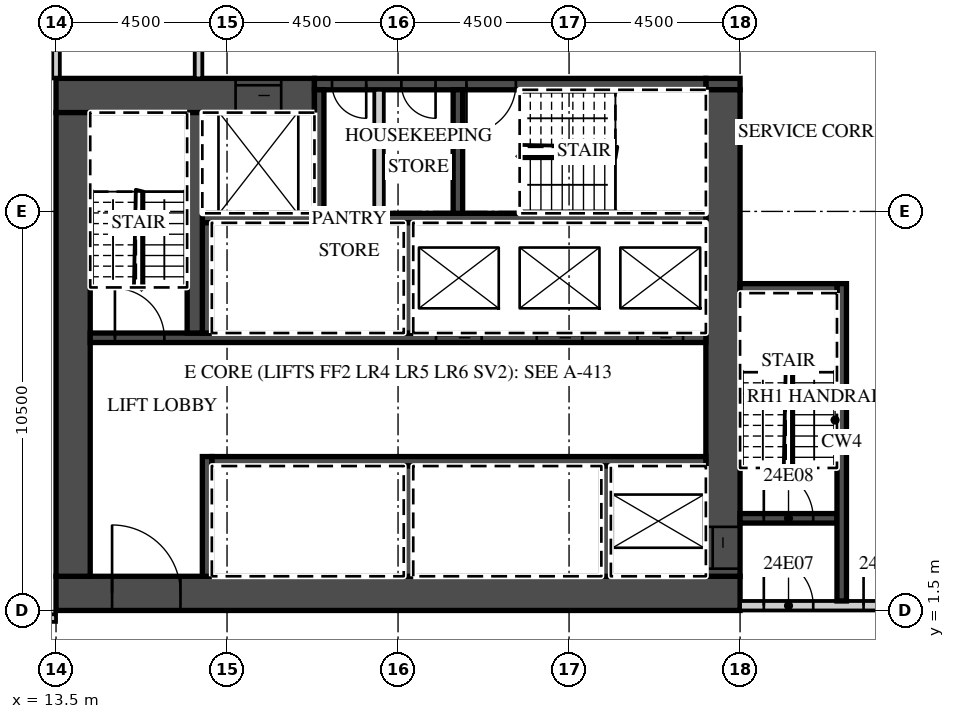
"""IFC4 building model, lengths in metres.
Left out: names, types, materials, properties, quantities, classifications, styles, units other than length and angle.
Written with IfcOpenShell. Run it as: python <this file> out.ifc"""

import sys

from ifc_helpers import new_model, si_unit, direction, frame, frame_2d, origin, place, context, subcontext, project, spatial, rectangle, extrude, element, fill, save


model = new_model("IFC4")
c1 = context("Model", 3, precision=1e-05, world=origin(), true_north=direction((0.0, 1.0)))
c2 = subcontext(c1, "Body", "Model", "MODEL_VIEW")
j1 = project(units=[si_unit("LENGTHUNIT", "METRE"), si_unit("PLANEANGLEUNIT", "RADIAN")], contexts=[c1])
p1 = place(None, origin())
s1 = spatial("IfcSite", under=j1, at=p1, CompositionType="ELEMENT")
p2 = place(p1, origin())
s2 = spatial("IfcBuilding", under=s1, at=p2, CompositionType="ELEMENT")
p3 = place(p2, frame((0.0, 0.0, 114.1)))
s3 = spatial("IfcBuildingStorey", under=s2, at=p3, CompositionType="ELEMENT", Elevation=114.1)
p4 = place(p3, frame((13.5, 15.5, 0.0), z_axis=(0.0, 0.0, 1.0), x_axis=(0.0, 1.0, 0.0)))
e1 = element("IfcWall", 1, at=p4, inside=s3, PredefinedType="PARTITIONING", context=c2, shape_type="SweptSolid", body=[
    extrude(rectangle(XDim=7.162, YDim=0.2, at=frame_2d((3.581, 0.0))), origin(), (0.0, 0.0, 1.0), 3.02),
])
p5 = place(p3, frame((-39.316, 1.3, 0.0), z_axis=(0.0, 0.0, 1.0), x_axis=(1.0, 0.0, 0.0)))
e2 = element("IfcWall", 2, at=p5, inside=s3, PredefinedType="PARTITIONING", context=c2, shape_type="SweptSolid", body=[
    extrude(rectangle(XDim=52.816, YDim=0.2, at=frame_2d((26.408, 0.0))), origin(), (0.0, 0.0, 1.0), 3.02),
])
p6 = place(p5, frame((0.15, 0.0, 0.0)))
e3 = element("IfcOpeningElement", 3, at=p6, cuts=e2, PredefinedType="OPENING", context=c2, shape_type="SweptSolid", body=[
    extrude(rectangle(XDim=0.9, YDim=2.1, at=frame_2d((0.45, 1.05))), frame((0.0, 0.11, 0.0), z_axis=(0.0, -1.0, 0.0), x_axis=(1.0, 0.0, 0.0)), (0.0, 0.0, 1.0), 0.22),
])
p7 = place(p5, frame((6.266, 0.0, 0.0)))
e4 = element("IfcOpeningElement", 4, at=p7, cuts=e2, PredefinedType="OPENING", context=c2, shape_type="SweptSolid", body=[
    extrude(rectangle(XDim=1.0, YDim=2.1, at=frame_2d((0.5, 1.05))), frame((0.0, 0.11, 0.0), z_axis=(0.0, -1.0, 0.0), x_axis=(1.0, 0.0, 0.0)), (0.0, 0.0, 1.0), 0.22),
])
p8 = place(p5, frame((10.741, 0.0, 0.0)))
e5 = element("IfcOpeningElement", 5, at=p8, cuts=e2, PredefinedType="OPENING", context=c2, shape_type="SweptSolid", body=[
    extrude(rectangle(XDim=1.0, YDim=2.1, at=frame_2d((0.5, 1.05))), frame((0.0, 0.11, 0.0), z_axis=(0.0, -1.0, 0.0), x_axis=(1.0, 0.0, 0.0)), (0.0, 0.0, 1.0), 0.22),
])
p9 = place(p5, frame((17.678, 0.0, 0.0)))
e6 = element("IfcOpeningElement", 6, at=p9, cuts=e2, PredefinedType="OPENING", context=c2, shape_type="SweptSolid", body=[
    extrude(rectangle(XDim=1.2, YDim=2.1, at=frame_2d((0.6, 1.05))), frame((0.0, 0.11, 0.0), z_axis=(0.0, -1.0, 0.0), x_axis=(1.0, 0.0, 0.0)), (0.0, 0.0, 1.0), 0.22),
])
p10 = place(p5, frame((26.678, 0.0, 0.0)))
e7 = element("IfcOpeningElement", 7, at=p10, cuts=e2, PredefinedType="OPENING", context=c2, shape_type="SweptSolid", body=[
    extrude(rectangle(XDim=1.2, YDim=2.1, at=frame_2d((0.6, 1.05))), frame((0.0, 0.11, 0.0), z_axis=(0.0, -1.0, 0.0), x_axis=(1.0, 0.0, 0.0)), (0.0, 0.0, 1.0), 0.22),
])
p11 = place(p5, frame((35.678, 0.0, 0.0)))
e8 = element("IfcOpeningElement", 8, at=p11, cuts=e2, PredefinedType="OPENING", context=c2, shape_type="SweptSolid", body=[
    extrude(rectangle(XDim=1.2, YDim=2.1, at=frame_2d((0.6, 1.05))), frame((0.0, 0.11, 0.0), z_axis=(0.0, -1.0, 0.0), x_axis=(1.0, 0.0, 0.0)), (0.0, 0.0, 1.0), 0.22),
])
p12 = place(p5, frame((41.754, 0.0, 0.0)))
e9 = element("IfcOpeningElement", 9, at=p12, cuts=e2, PredefinedType="OPENING", context=c2, shape_type="SweptSolid", body=[
    extrude(rectangle(XDim=1.2, YDim=2.1, at=frame_2d((0.6, 1.05))), frame((0.0, 0.11, 0.0), z_axis=(0.0, -1.0, 0.0), x_axis=(1.0, 0.0, 0.0)), (0.0, 0.0, 1.0), 0.22),
])
p13 = place(p5, frame((51.241, 0.0, 0.0)))
e10 = element("IfcOpeningElement", 10, at=p13, cuts=e2, PredefinedType="OPENING", context=c2, shape_type="SweptSolid", body=[
    extrude(rectangle(XDim=1.0, YDim=2.1, at=frame_2d((0.5, 1.05))), frame((0.0, 0.11, 0.0), z_axis=(0.0, -1.0, 0.0), x_axis=(1.0, 0.0, 0.0)), (0.0, 0.0, 1.0), 0.22),
])
p14 = place(p3, frame((13.5, 1.95, 0.0), z_axis=(0.0, 0.0, 1.0), x_axis=(1.0, 0.0, 0.0)))
e11 = element("IfcWall", 11, at=p14, inside=s3, PredefinedType="SHEAR", context=c2, shape_type="SweptSolid", body=[
    extrude(rectangle(XDim=18.0, YDim=0.9, at=frame_2d((9.0, 0.0))), origin(), (0.0, 0.0, 1.0), 3.02),
])
p15 = place(p14, frame((1.475, 0.0, 0.0)))
e12 = element("IfcOpeningElement", 12, at=p15, cuts=e11, PredefinedType="OPENING", context=c2, shape_type="SweptSolid", body=[
    extrude(rectangle(XDim=1.8, YDim=2.1, at=frame_2d((0.9, 1.05))), frame((0.0, 0.46, 0.0), z_axis=(0.0, -1.0, 0.0), x_axis=(1.0, 0.0, 0.0)), (0.0, 0.0, 1.0), 0.92),
])
p16 = place(p3, frame((13.5, 15.05, 0.0), z_axis=(0.0, 0.0, 1.0), x_axis=(1.0, 0.0, 0.0)))
e13 = element("IfcWall", 13, at=p16, inside=s3, PredefinedType="SHEAR", context=c2, shape_type="SweptSolid", body=[
    extrude(rectangle(XDim=6.8, YDim=0.9, at=frame_2d((3.4, 0.0))), origin(), (0.0, 0.0, 1.0), 3.02),
])
p17 = place(p16, frame((4.725, 0.0, 0.0)))
e14 = element("IfcOpeningElement", 14, at=p17, cuts=e13, PredefinedType="OPENING", context=c2, shape_type="SweptSolid", body=[
    extrude(rectangle(XDim=1.2, YDim=2.1, at=frame_2d((0.6, 1.05))), frame((0.0, 0.46, 0.0), z_axis=(0.0, -1.0, 0.0), x_axis=(1.0, 0.0, 0.0)), (0.0, 0.0, 1.0), 0.92),
])
p18 = place(p3, frame((30.6, 15.35, 0.0), z_axis=(0.0, 0.0, 1.0), x_axis=(1.0, 0.0, 0.0)))
e15 = element("IfcWall", 15, at=p18, inside=s3, PredefinedType="SHEAR", context=c2, shape_type="SweptSolid", body=[
    extrude(rectangle(XDim=0.9, YDim=0.3, at=frame_2d((0.45, 0.0))), origin(), (0.0, 0.0, 1.0), 3.02),
])
p19 = place(p3, frame((20.3, 15.35, 0.0), z_axis=(0.0, 0.0, 1.0), x_axis=(1.0, 0.0, 0.0)))
e16 = element("IfcWall", 16, at=p19, inside=s3, PredefinedType="SHEAR", context=c2, shape_type="SweptSolid", body=[
    extrude(rectangle(XDim=10.3, YDim=0.3, at=frame_2d((5.15, 0.0))), origin(), (0.0, 0.0, 1.0), 3.02),
])
p20 = place(p19, frame((4.0, 0.0, 0.0)))
e17 = element("IfcOpeningElement", 17, at=p20, cuts=e16, PredefinedType="OPENING", context=c2, shape_type="SweptSolid", body=[
    extrude(rectangle(XDim=1.3, YDim=2.1, at=frame_2d((0.65, 1.05))), frame((0.0, 0.16, 0.0), z_axis=(0.0, -1.0, 0.0), x_axis=(1.0, 0.0, 0.0)), (0.0, 0.0, 1.0), 0.32),
])
p21 = place(p19, frame((2.288, 0.0, 0.0)))
e18 = element("IfcOpeningElement", 18, at=p21, cuts=e16, PredefinedType="OPENING", context=c2, shape_type="SweptSolid", body=[
    extrude(rectangle(XDim=0.9, YDim=2.1, at=frame_2d((0.45, 1.05))), frame((0.0, 0.16, 0.0), z_axis=(0.0, -1.0, 0.0), x_axis=(1.0, 0.0, 0.0)), (0.0, 0.0, 1.0), 0.32),
])
p22 = place(p19, frame((0.462, 0.0, 0.0)))
e19 = element("IfcOpeningElement", 19, at=p22, cuts=e16, PredefinedType="OPENING", context=c2, shape_type="SweptSolid", body=[
    extrude(rectangle(XDim=0.9, YDim=2.1, at=frame_2d((0.45, 1.05))), frame((0.0, 0.16, 0.0), z_axis=(0.0, -1.0, 0.0), x_axis=(1.0, 0.0, 0.0)), (0.0, 0.0, 1.0), 0.32),
])
p23 = place(p3, frame((31.05, 2.4, 0.0), z_axis=(0.0, 0.0, 1.0), x_axis=(0.0, 1.0, 0.0)))
e20 = element("IfcWall", 20, at=p23, inside=s3, PredefinedType="SHEAR", context=c2, shape_type="SweptSolid", body=[
    extrude(rectangle(XDim=12.8, YDim=0.9, at=frame_2d((6.4, 0.0))), origin(), (0.0, 0.0, 1.0), 3.02),
])
p24 = place(p23, frame((0.2, 0.0, 0.0)))
e21 = element("IfcOpeningElement", 21, at=p24, cuts=e20, PredefinedType="OPENING", context=c2, shape_type="SweptSolid", body=[
    extrude(rectangle(XDim=1.1, YDim=2.1, at=frame_2d((0.55, 1.05))), frame((0.0, 0.46, 0.0), z_axis=(0.0, -1.0, 0.0), x_axis=(1.0, 0.0, 0.0)), (0.0, 0.0, 1.0), 0.92),
])
p25 = place(p3, frame((13.95, 2.4, 0.0), z_axis=(0.0, 0.0, 1.0), x_axis=(0.0, 1.0, 0.0)))
e22 = element("IfcWall", 22, at=p25, inside=s3, PredefinedType="SHEAR", context=c2, shape_type="SweptSolid", body=[
    extrude(rectangle(XDim=12.2, YDim=0.9, at=frame_2d((6.1, 0.0))), origin(), (0.0, 0.0, 1.0), 3.02),
])
p26 = place(p3, frame((17.6, 5.425, 0.0), z_axis=(0.0, 0.0, 1.0), x_axis=(1.0, 0.0, 0.0)))
e23 = element("IfcWall", 23, at=p26, inside=s3, PredefinedType="SHEAR", context=c2, shape_type="SweptSolid", body=[
    extrude(rectangle(XDim=13.0, YDim=0.25, at=frame_2d((6.5, 0.0))), origin(), (0.0, 0.0, 1.0), 3.02),
])
p27 = place(p3, frame((17.475, 2.4, 0.0), z_axis=(0.0, 0.0, 1.0), x_axis=(0.0, 1.0, 0.0)))
e24 = element("IfcWall", 24, at=p27, inside=s3, PredefinedType="SHEAR", context=c2, shape_type="SweptSolid", body=[
    extrude(rectangle(XDim=3.15, YDim=0.25, at=frame_2d((1.575, 0.0))), origin(), (0.0, 0.0, 1.0), 3.02),
])
for number, where, z_axis, x_axis in (
    (25, (27.975, 2.4, 0.0), (0.0, 0.0, 1.0), (0.0, 1.0, 0.0)),
    (26, (22.775, 2.4, 0.0), (0.0, 0.0, 1.0), (0.0, 1.0, 0.0)),
):
    element("IfcWall", number, at=place(p3, frame(where, z_axis=z_axis, x_axis=x_axis)), inside=s3, PredefinedType="SHEAR", context=c2, shape_type="SweptSolid", body=[
        extrude(rectangle(XDim=2.9, YDim=0.25, at=frame_2d((1.45, 0.0))), origin(), (0.0, 0.0, 1.0), 3.02),
    ])
p28 = place(p3, frame((14.4, 8.675, 0.0), z_axis=(0.0, 0.0, 1.0), x_axis=(1.0, 0.0, 0.0)))
e27 = element("IfcWall", 27, at=p28, inside=s3, PredefinedType="SHEAR", context=c2, shape_type="SweptSolid", body=[
    extrude(rectangle(XDim=16.2, YDim=0.25, at=frame_2d((8.1, 0.0))), origin(), (0.0, 0.0, 1.0), 3.02),
])
p29 = place(p28, frame((14.4, 0.0, 0.0)))
e28 = element("IfcOpeningElement", 28, at=p29, cuts=e27, PredefinedType="OPENING", context=c2, shape_type="SweptSolid", body=[
    extrude(rectangle(XDim=1.2, YDim=2.1, at=frame_2d((0.6, 1.05))), frame((0.0, 0.135, 0.0), z_axis=(0.0, -1.0, 0.0), x_axis=(1.0, 0.0, 0.0)), (0.0, 0.0, 1.0), 0.27),
])
p30 = place(p28, frame((11.75, 0.0, 0.0)))
e29 = element("IfcOpeningElement", 29, at=p30, cuts=e27, PredefinedType="OPENING", context=c2, shape_type="SweptSolid", body=[
    extrude(rectangle(XDim=1.2, YDim=2.1, at=frame_2d((0.6, 1.05))), frame((0.0, 0.135, 0.0), z_axis=(0.0, -1.0, 0.0), x_axis=(1.0, 0.0, 0.0)), (0.0, 0.0, 1.0), 0.27),
])
p31 = place(p28, frame((9.1, 0.0, 0.0)))
e30 = element("IfcOpeningElement", 30, at=p31, cuts=e27, PredefinedType="OPENING", context=c2, shape_type="SweptSolid", body=[
    extrude(rectangle(XDim=1.2, YDim=2.1, at=frame_2d((0.6, 1.05))), frame((0.0, 0.135, 0.0), z_axis=(0.0, -1.0, 0.0), x_axis=(1.0, 0.0, 0.0)), (0.0, 0.0, 1.0), 0.27),
])
p32 = place(p28, frame((0.65, 0.0, 0.0)))
e31 = element("IfcOpeningElement", 31, at=p32, cuts=e27, PredefinedType="OPENING", context=c2, shape_type="SweptSolid", body=[
    extrude(rectangle(XDim=1.3, YDim=2.1, at=frame_2d((0.65, 1.05))), frame((0.0, 0.135, 0.0), z_axis=(0.0, -1.0, 0.0), x_axis=(1.0, 0.0, 0.0)), (0.0, 0.0, 1.0), 0.27),
])
p33 = place(p3, frame((17.35, 11.825, 0.0), z_axis=(0.0, 0.0, 1.0), x_axis=(1.0, 0.0, 0.0)))
e32 = element("IfcWall", 32, at=p33, inside=s3, PredefinedType="SHEAR", context=c2, shape_type="SweptSolid", body=[
    extrude(rectangle(XDim=13.25, YDim=0.25, at=frame_2d((6.625, 0.0))), origin(), (0.0, 0.0, 1.0), 3.02),
])
for number, where, z_axis, x_axis in (
    (33, (17.475, 8.8, 0.0), (0.0, 0.0, 1.0), (0.0, 1.0, 0.0)),
    (34, (22.775, 8.8, 0.0), (0.0, 0.0, 1.0), (0.0, 1.0, 0.0)),
):
    element("IfcWall", number, at=place(p3, frame(where, z_axis=z_axis, x_axis=x_axis)), inside=s3, PredefinedType="SHEAR", context=c2, shape_type="SweptSolid", body=[
        extrude(rectangle(XDim=2.9, YDim=0.25, at=frame_2d((1.45, 0.0))), origin(), (0.0, 0.0, 1.0), 3.02),
    ])
p34 = place(p3, frame((17.15, 8.8, 0.0), z_axis=(0.0, 0.0, 1.0), x_axis=(0.0, 1.0, 0.0)))
e35 = element("IfcWall", 35, at=p34, inside=s3, PredefinedType="SHEAR", context=c2, shape_type="SweptSolid", body=[
    extrude(rectangle(XDim=5.8, YDim=0.4, at=frame_2d((2.9, 0.0))), origin(), (0.0, 0.0, 1.0), 3.02),
])
for number, where, z_axis, x_axis in (
    (36, (20.425, 11.95, 0.0), (0.0, 0.0, 1.0), (0.0, 1.0, 0.0)),
    (37, (24.075, 11.95, 0.0), (0.0, 0.0, 1.0), (0.0, 1.0, 0.0)),
):
    element("IfcWall", number, at=place(p3, frame(where, z_axis=z_axis, x_axis=x_axis)), inside=s3, PredefinedType="SHEAR", context=c2, shape_type="SweptSolid", body=[
        extrude(rectangle(XDim=3.25, YDim=0.25, at=frame_2d((1.625, 0.0))), origin(), (0.0, 0.0, 1.0), 3.02),
    ])
p35 = place(p3, frame((22.0, 11.95, 0.0), z_axis=(0.0, 0.0, 1.0), x_axis=(0.0, 1.0, 0.0)))
e38 = element("IfcWall", 38, at=p35, inside=s3, PredefinedType="PARTITIONING", context=c2, shape_type="SweptSolid", body=[
    extrude(rectangle(XDim=3.25, YDim=0.25, at=frame_2d((1.625, 0.0))), origin(), (0.0, 0.0, 1.0), 3.02),
])
p36 = place(p3, frame((31.5, 1.625, 0.0), z_axis=(0.0, 0.0, 1.0), x_axis=(1.0, 0.0, 0.0)))
e39 = element("IfcWall", 39, at=p36, inside=s3, PredefinedType="PARTITIONING", context=c2, shape_type="SweptSolid", body=[
    extrude(rectangle(XDim=15.65, YDim=0.25, at=frame_2d((7.825, 0.0))), origin(), (0.0, 0.0, 1.0), 3.02),
])
p37 = place(p36, frame((0.625, 0.0, 0.0)))
e40 = element("IfcOpeningElement", 40, at=p37, cuts=e39, PredefinedType="OPENING", context=c2, shape_type="SweptSolid", body=[
    extrude(rectangle(XDim=1.3, YDim=2.1, at=frame_2d((0.65, 1.05))), frame((0.0, 0.135, 0.0), z_axis=(0.0, -1.0, 0.0), x_axis=(1.0, 0.0, 0.0)), (0.0, 0.0, 1.0), 0.27),
])
p38 = place(p36, frame((3.25, 0.0, 0.0)))
e41 = element("IfcOpeningElement", 41, at=p38, cuts=e39, PredefinedType="OPENING", context=c2, shape_type="SweptSolid", body=[
    extrude(rectangle(XDim=1.1, YDim=2.1, at=frame_2d((0.55, 1.05))), frame((0.0, 0.135, 0.0), z_axis=(0.0, -1.0, 0.0), x_axis=(1.0, 0.0, 0.0)), (0.0, 0.0, 1.0), 0.27),
])
p39 = place(p3, frame((31.5, 3.925, 0.0), z_axis=(0.0, 0.0, 1.0), x_axis=(1.0, 0.0, 0.0)))
e42 = element("IfcWall", 42, at=p39, inside=s3, PredefinedType="SHEAR", context=c2, shape_type="SweptSolid", body=[
    extrude(rectangle(XDim=2.55, YDim=0.25, at=frame_2d((1.275, 0.0))), origin(), (0.0, 0.0, 1.0), 3.02),
])
p40 = place(p39, frame((0.625, 0.0, 0.0)))
e43 = element("IfcOpeningElement", 43, at=p40, cuts=e42, PredefinedType="OPENING", context=c2, shape_type="SweptSolid", body=[
    extrude(rectangle(XDim=1.3, YDim=2.1, at=frame_2d((0.65, 1.05))), frame((0.0, 0.135, 0.0), z_axis=(0.0, -1.0, 0.0), x_axis=(1.0, 0.0, 0.0)), (0.0, 0.0, 1.0), 0.27),
])
p41 = place(p3, frame((34.175, 1.75, 0.0), z_axis=(0.0, 0.0, 1.0), x_axis=(0.0, 1.0, 0.0)))
e44 = element("IfcWall", 44, at=p41, inside=s3, PredefinedType="SHEAR", context=c2, shape_type="SweptSolid", body=[
    extrude(rectangle(XDim=8.35, YDim=0.25, at=frame_2d((4.175, 0.0))), origin(), (0.0, 0.0, 1.0), 3.02),
])
p42 = place(p3, frame((31.5, 9.975, 0.0), z_axis=(0.0, 0.0, 1.0), x_axis=(1.0, 0.0, 0.0)))
e45 = element("IfcWall", 45, at=p42, inside=s3, PredefinedType="SHEAR", context=c2, shape_type="SweptSolid", body=[
    extrude(rectangle(XDim=2.55, YDim=0.25, at=frame_2d((1.275, 0.0))), origin(), (0.0, 0.0, 1.0), 3.02),
])
p43 = place(p3, frame((17.25, 15.5, 0.0), z_axis=(0.0, 0.0, 1.0), x_axis=(0.0, 1.0, 0.0)))
e46 = element("IfcWall", 46, at=p43, inside=s3, PredefinedType="PARTITIONING", context=c2, shape_type="SweptSolid", body=[
    extrude(rectangle(XDim=2.2, YDim=0.2, at=frame_2d((1.1, 0.0))), origin(), (0.0, 0.0, 1.0), 3.02),
])
p44 = place(p29, origin())
e47 = element("IfcDoor", 47, at=p44, inside=s3, OperationType="SLIDING_TO_LEFT", PredefinedType="DOOR", context=c2, shape_type="SweptSolid", body=[
    extrude(rectangle(XDim=1.2, YDim=2.1, at=frame_2d((0.6, 1.05))), frame((0.0, 0.025, 0.0), z_axis=(0.0, -1.0, 0.0), x_axis=(1.0, 0.0, 0.0)), (0.0, 0.0, 1.0), 0.05),
])
fill(e28, e47)
p45 = place(p30, origin())
e48 = element("IfcDoor", 48, at=p45, inside=s3, OperationType="SLIDING_TO_RIGHT", PredefinedType="DOOR", context=c2, shape_type="SweptSolid", body=[
    extrude(rectangle(XDim=1.2, YDim=2.1, at=frame_2d((0.6, 1.05))), frame((0.0, 0.025, 0.0), z_axis=(0.0, -1.0, 0.0), x_axis=(1.0, 0.0, 0.0)), (0.0, 0.0, 1.0), 0.05),
])
fill(e29, e48)
p46 = place(p31, origin())
e49 = element("IfcDoor", 49, at=p46, inside=s3, OperationType="SLIDING_TO_RIGHT", PredefinedType="DOOR", context=c2, shape_type="SweptSolid", body=[
    extrude(rectangle(XDim=1.2, YDim=2.1, at=frame_2d((0.6, 1.05))), frame((0.0, 0.025, 0.0), z_axis=(0.0, -1.0, 0.0), x_axis=(1.0, 0.0, 0.0)), (0.0, 0.0, 1.0), 0.05),
])
fill(e30, e49)
p47 = place(p17, origin())
e50 = element("IfcDoor", 50, at=p47, inside=s3, OperationType="SLIDING_TO_LEFT", PredefinedType="DOOR", context=c2, shape_type="SweptSolid", body=[
    extrude(rectangle(XDim=1.2, YDim=2.1, at=frame_2d((0.6, 1.05))), frame((0.0, 0.025, 0.0), z_axis=(0.0, -1.0, 0.0), x_axis=(1.0, 0.0, 0.0)), (0.0, 0.0, 1.0), 0.05),
])
fill(e14, e50)
p48 = place(p24, origin())
e51 = element("IfcDoor", 51, at=p48, inside=s3, OperationType="SLIDING_TO_LEFT", PredefinedType="DOOR", context=c2, shape_type="SweptSolid", body=[
    extrude(rectangle(XDim=1.1, YDim=2.1, at=frame_2d((0.55, 1.05))), frame((0.0, 0.025, 0.0), z_axis=(0.0, -1.0, 0.0), x_axis=(1.0, 0.0, 0.0)), (0.0, 0.0, 1.0), 0.05),
])
fill(e21, e51)
p49 = place(p15, origin())
e52 = element("IfcDoor", 52, at=p49, inside=s3, OperationType="DOUBLE_DOOR_DOUBLE_SWING", PredefinedType="DOOR", context=c2, shape_type="SweptSolid", body=[
    extrude(rectangle(XDim=1.8, YDim=2.1, at=frame_2d((0.9, 1.05))), frame((0.0, 0.025, 0.0), z_axis=(0.0, -1.0, 0.0), x_axis=(1.0, 0.0, 0.0)), (0.0, 0.0, 1.0), 0.05),
])
fill(e12, e52)
p50 = place(p37, origin())
e53 = element("IfcDoor", 53, at=p50, inside=s3, OperationType="SINGLE_SWING_LEFT", PredefinedType="DOOR", context=c2, shape_type="SweptSolid", body=[
    extrude(rectangle(XDim=1.3, YDim=2.1, at=frame_2d((0.65, 1.05))), frame((0.0, 0.025, 0.0), z_axis=(0.0, -1.0, 0.0), x_axis=(1.0, 0.0, 0.0)), (0.0, 0.0, 1.0), 0.05),
])
fill(e40, e53)
p51 = place(p40, origin())
e54 = element("IfcDoor", 54, at=p51, inside=s3, OperationType="SINGLE_SWING_LEFT", PredefinedType="DOOR", context=c2, shape_type="SweptSolid", body=[
    extrude(rectangle(XDim=1.3, YDim=2.1, at=frame_2d((0.65, 1.05))), frame((0.0, 0.025, 0.0), z_axis=(0.0, -1.0, 0.0), x_axis=(1.0, 0.0, 0.0)), (0.0, 0.0, 1.0), 0.05),
])
fill(e43, e54)
p52 = place(p38, origin())
e55 = element("IfcDoor", 55, at=p52, inside=s3, OperationType="SINGLE_SWING_LEFT", PredefinedType="DOOR", context=c2, shape_type="SweptSolid", body=[
    extrude(rectangle(XDim=1.1, YDim=2.1, at=frame_2d((0.55, 1.05))), frame((0.0, 0.025, 0.0), z_axis=(0.0, -1.0, 0.0), x_axis=(1.0, 0.0, 0.0)), (0.0, 0.0, 1.0), 0.05),
])
fill(e41, e55)
p53 = place(p32, origin())
e56 = element("IfcDoor", 56, at=p53, inside=s3, OperationType="SINGLE_SWING_LEFT", PredefinedType="DOOR", context=c2, shape_type="SweptSolid", body=[
    extrude(rectangle(XDim=1.3, YDim=2.1, at=frame_2d((0.65, 1.05))), frame((0.0, 0.025, 0.0), z_axis=(0.0, -1.0, 0.0), x_axis=(1.0, 0.0, 0.0)), (0.0, 0.0, 1.0), 0.05),
])
fill(e31, e56)
p54 = place(p20, origin())
e57 = element("IfcDoor", 57, at=p54, inside=s3, OperationType="SINGLE_SWING_LEFT", PredefinedType="DOOR", context=c2, shape_type="SweptSolid", body=[
    extrude(rectangle(XDim=1.3, YDim=2.1, at=frame_2d((0.65, 1.05))), frame((0.0, 0.025, 0.0), z_axis=(0.0, -1.0, 0.0), x_axis=(1.0, 0.0, 0.0)), (0.0, 0.0, 1.0), 0.05),
])
fill(e17, e57)
p55 = place(p21, origin())
e58 = element("IfcDoor", 58, at=p55, inside=s3, OperationType="SINGLE_SWING_RIGHT", PredefinedType="DOOR", context=c2, shape_type="SweptSolid", body=[
    extrude(rectangle(XDim=0.9, YDim=2.1, at=frame_2d((0.45, 1.05))), frame((0.0, 0.025, 0.0), z_axis=(0.0, -1.0, 0.0), x_axis=(1.0, 0.0, 0.0)), (0.0, 0.0, 1.0), 0.05),
])
fill(e18, e58)
p56 = place(p22, origin())
e59 = element("IfcDoor", 59, at=p56, inside=s3, OperationType="SINGLE_SWING_RIGHT", PredefinedType="DOOR", context=c2, shape_type="SweptSolid", body=[
    extrude(rectangle(XDim=0.9, YDim=2.1, at=frame_2d((0.45, 1.05))), frame((0.0, 0.025, 0.0), z_axis=(0.0, -1.0, 0.0), x_axis=(1.0, 0.0, 0.0)), (0.0, 0.0, 1.0), 0.05),
])
fill(e19, e59)
save(model, sys.argv[1])
